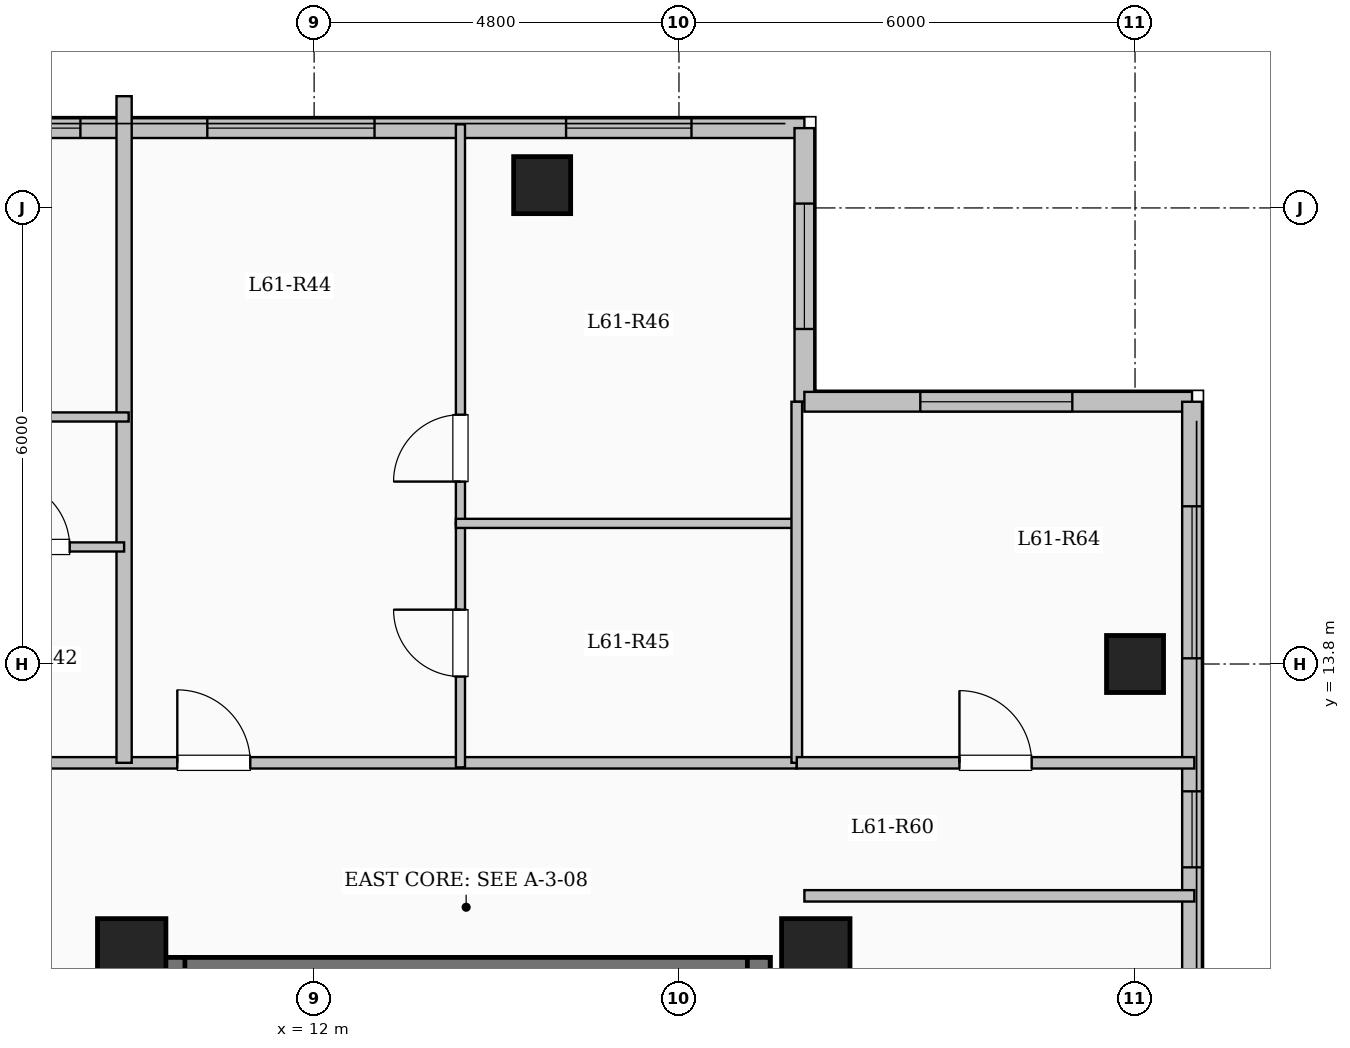
"""IFC4 building model, lengths in metres.
Left out: names, types, materials, properties, quantities, classifications, styles, units other than length and angle.
Written with IfcOpenShell. Run it as: python <this file> out.ifc"""

import sys

from ifc_helpers import new_model, si_unit, direction, frame, frame_2d, origin, origin_2d, place, context, subcontext, project, spatial, rectangle, extrude, element, fill, save


model = new_model("IFC4")
c1 = context("Model", 3, precision=1e-05, world=origin(), true_north=direction((0.0, 1.0)))
c2 = subcontext(c1, "Body", "Model", "MODEL_VIEW")
j1 = project(units=[si_unit("LENGTHUNIT", "METRE"), si_unit("PLANEANGLEUNIT", "RADIAN")], contexts=[c1])
p1 = place(None, origin())
s1 = spatial("IfcSite", under=j1, at=p1, CompositionType="ELEMENT")
p2 = place(p1, origin())
s2 = spatial("IfcBuilding", under=s1, at=p2, CompositionType="ELEMENT")
p3 = place(p2, frame((0.0, 0.0, 223.75)))
s3 = spatial("IfcBuildingStorey", under=s2, at=p3, CompositionType="ELEMENT", Elevation=223.75)
for number, where, z_axis, x_axis in (
    (1, (9.6, 10.0, 0.0), (0.0, 0.0, 1.0), (1.0, 0.0, 0.0)),
    (2, (18.6, 10.0, 0.0), (0.0, 0.0, 1.0), (1.0, 0.0, 0.0)),
):
    element("IfcColumn", number, at=place(p3, frame(where, z_axis=z_axis, x_axis=x_axis)), inside=s3, PredefinedType="COLUMN", context=c2, shape_type="SweptSolid", body=[
        extrude(rectangle(XDim=0.9, YDim=0.9, at=origin_2d()), origin(), (0.0, 0.0, 1.0), 3.35),
    ])
for number, where, z_axis, x_axis in (
    (3, (15.0, 20.1, 0.0), (0.0, 0.0, 1.0), (1.0, 0.0, 0.0)),
    (4, (22.8, 13.8, 0.0), (0.0, 0.0, 1.0), (1.0, 0.0, 0.0)),
):
    element("IfcColumn", number, at=place(p3, frame(where, z_axis=z_axis, x_axis=x_axis)), inside=s3, PredefinedType="COLUMN", context=c2, shape_type="SweptSolid", body=[
        extrude(rectangle(XDim=0.75, YDim=0.75, at=origin_2d()), origin(), (0.0, 0.0, 1.0), 3.35),
    ])
p4 = place(p3, frame((7.35, 20.85, 0.0), z_axis=(0.0, 0.0, 1.0), x_axis=(1.0, 0.0, 0.0)))
e5 = element("IfcWall", 5, at=p4, inside=s3, PredefinedType="SOLIDWALL", context=c2, shape_type="SweptSolid", body=[
    extrude(rectangle(XDim=11.1, YDim=0.26, at=frame_2d((5.55, 0.0))), origin(), (0.0, 0.0, 1.0), 3.05),
])
p5 = place(p4, frame((0.375, 0.0, 0.95)))
e6 = element("IfcOpeningElement", 6, at=p5, cuts=e5, PredefinedType="OPENING", context=c2, shape_type="SweptSolid", body=[
    extrude(rectangle(XDim=1.2, YDim=1.5, at=frame_2d((0.6, 0.75))), frame((0.0, 0.14, 0.0), z_axis=(0.0, -1.0, 0.0), x_axis=(1.0, 0.0, 0.0)), (0.0, 0.0, 1.0), 0.28),
])
p6 = place(p4, frame((3.245, 0.0, 0.9)))
e7 = element("IfcOpeningElement", 7, at=p6, cuts=e5, PredefinedType="OPENING", context=c2, shape_type="SweptSolid", body=[
    extrude(rectangle(XDim=2.2, YDim=1.75, at=frame_2d((1.1, 0.875))), frame((0.0, 0.14, 0.0), z_axis=(0.0, -1.0, 0.0), x_axis=(1.0, 0.0, 0.0)), (0.0, 0.0, 1.0), 0.28),
])
p7 = place(p4, frame((7.965, 0.0, 0.9)))
e8 = element("IfcOpeningElement", 8, at=p7, cuts=e5, PredefinedType="OPENING", context=c2, shape_type="SweptSolid", body=[
    extrude(rectangle(XDim=1.65, YDim=1.6, at=frame_2d((0.825, 0.8))), frame((0.0, 0.14, 0.0), z_axis=(0.0, -1.0, 0.0), x_axis=(1.0, 0.0, 0.0)), (0.0, 0.0, 1.0), 0.28),
])
p8 = place(p3, frame((18.45, 20.85, 0.0), z_axis=(0.0, 0.0, 1.0), x_axis=(0.0, -1.0, 0.0)))
e9 = element("IfcWall", 9, at=p8, inside=s3, PredefinedType="SOLIDWALL", context=c2, shape_type="SweptSolid", body=[
    extrude(rectangle(XDim=3.6, YDim=0.26, at=frame_2d((1.8, 0.0))), origin(), (0.0, 0.0, 1.0), 3.05),
])
p9 = place(p8, frame((0.992, 0.0, 0.9)))
e10 = element("IfcOpeningElement", 10, at=p9, cuts=e9, PredefinedType="OPENING", context=c2, shape_type="SweptSolid", body=[
    extrude(rectangle(XDim=1.65, YDim=1.6, at=frame_2d((0.825, 0.8))), frame((0.0, 0.14, 0.0), z_axis=(0.0, -1.0, 0.0), x_axis=(1.0, 0.0, 0.0)), (0.0, 0.0, 1.0), 0.28),
])
p10 = place(p3, frame((18.45, 17.25, 0.0), z_axis=(0.0, 0.0, 1.0), x_axis=(1.0, 0.0, 0.0)))
e11 = element("IfcWall", 11, at=p10, inside=s3, PredefinedType="SOLIDWALL", context=c2, shape_type="SweptSolid", body=[
    extrude(rectangle(XDim=5.1, YDim=0.26, at=frame_2d((2.55, 0.0))), origin(), (0.0, 0.0, 1.0), 3.05),
])
p11 = place(p10, frame((1.525, 0.0, 0.9)))
e12 = element("IfcOpeningElement", 12, at=p11, cuts=e11, PredefinedType="OPENING", context=c2, shape_type="SweptSolid", body=[
    extrude(rectangle(XDim=2.0, YDim=1.7, at=frame_2d((1.0, 0.85))), frame((0.0, 0.14, 0.0), z_axis=(0.0, -1.0, 0.0), x_axis=(1.0, 0.0, 0.0)), (0.0, 0.0, 1.0), 0.28),
])
p12 = place(p3, frame((23.55, 17.25, 0.0), z_axis=(0.0, 0.0, 1.0), x_axis=(0.0, -1.0, 0.0)))
e13 = element("IfcWall", 13, at=p12, inside=s3, PredefinedType="SOLIDWALL", context=c2, shape_type="SweptSolid", body=[
    extrude(rectangle(XDim=34.5, YDim=0.26, at=frame_2d((17.25, 0.0))), origin(), (0.0, 0.0, 1.0), 3.05),
])
p13 = place(p12, frame((1.375, 0.0, 0.9)))
e14 = element("IfcOpeningElement", 14, at=p13, cuts=e13, PredefinedType="OPENING", context=c2, shape_type="SweptSolid", body=[
    extrude(rectangle(XDim=2.0, YDim=1.7, at=frame_2d((1.0, 0.85))), frame((0.0, 0.14, 0.0), z_axis=(0.0, -1.0, 0.0), x_axis=(1.0, 0.0, 0.0)), (0.0, 0.0, 1.0), 0.28),
])
p14 = place(p12, frame((5.125, 0.0, 0.95)))
e15 = element("IfcOpeningElement", 15, at=p14, cuts=e13, PredefinedType="OPENING", context=c2, shape_type="SweptSolid", body=[
    extrude(rectangle(XDim=1.0, YDim=1.5, at=frame_2d((0.5, 0.75))), frame((0.0, 0.14, 0.0), z_axis=(0.0, -1.0, 0.0), x_axis=(1.0, 0.0, 0.0)), (0.0, 0.0, 1.0), 0.28),
])
p15 = place(p12, frame((8.375, 0.0, 0.9)))
e16 = element("IfcOpeningElement", 16, at=p15, cuts=e13, PredefinedType="OPENING", context=c2, shape_type="SweptSolid", body=[
    extrude(rectangle(XDim=2.0, YDim=1.7, at=frame_2d((1.0, 0.85))), frame((0.0, 0.14, 0.0), z_axis=(0.0, -1.0, 0.0), x_axis=(1.0, 0.0, 0.0)), (0.0, 0.0, 1.0), 0.28),
])
p16 = place(p12, frame((13.2, 0.0, 0.9)))
e17 = element("IfcOpeningElement", 17, at=p16, cuts=e13, PredefinedType="OPENING", context=c2, shape_type="SweptSolid", body=[
    extrude(rectangle(XDim=1.65, YDim=1.6, at=frame_2d((0.825, 0.8))), frame((0.0, 0.14, 0.0), z_axis=(0.0, -1.0, 0.0), x_axis=(1.0, 0.0, 0.0)), (0.0, 0.0, 1.0), 0.28),
])
p17 = place(p12, frame((19.05, 0.0, 0.9)))
e18 = element("IfcOpeningElement", 18, at=p17, cuts=e13, PredefinedType="OPENING", context=c2, shape_type="SweptSolid", body=[
    extrude(rectangle(XDim=2.2, YDim=1.75, at=frame_2d((1.1, 0.875))), frame((0.0, 0.14, 0.0), z_axis=(0.0, -1.0, 0.0), x_axis=(1.0, 0.0, 0.0)), (0.0, 0.0, 1.0), 0.28),
])
p18 = place(p12, frame((24.975, 0.0, 0.95)))
e19 = element("IfcOpeningElement", 19, at=p18, cuts=e13, PredefinedType="OPENING", context=c2, shape_type="SweptSolid", body=[
    extrude(rectangle(XDim=1.2, YDim=1.5, at=frame_2d((0.6, 0.75))), frame((0.0, 0.14, 0.0), z_axis=(0.0, -1.0, 0.0), x_axis=(1.0, 0.0, 0.0)), (0.0, 0.0, 1.0), 0.28),
])
p19 = place(p12, frame((29.475, 0.0, 0.9)))
e20 = element("IfcOpeningElement", 20, at=p19, cuts=e13, PredefinedType="OPENING", context=c2, shape_type="SweptSolid", body=[
    extrude(rectangle(XDim=2.2, YDim=1.75, at=frame_2d((1.1, 0.875))), frame((0.0, 0.14, 0.0), z_axis=(0.0, -1.0, 0.0), x_axis=(1.0, 0.0, 0.0)), (0.0, 0.0, 1.0), 0.28),
])
p20 = place(p3, frame((10.0, 9.79, 0.0), z_axis=(0.0, 0.0, 1.0), x_axis=(1.0, 0.0, 0.0)))
e21 = element("IfcWall", 21, at=p20, inside=s3, PredefinedType="SHEAR", context=c2, shape_type="SweptSolid", body=[
    extrude(rectangle(XDim=8.0, YDim=0.3, at=frame_2d((4.0, 0.0))), origin(), (0.0, 0.0, 1.0), 3.35),
])
for number, where, z_axis, x_axis in (
    (22, (10.15, 6.35, 0.0), (0.0, 0.0, 1.0), (0.0, 1.0, 0.0)),
    (23, (17.85, 6.35, 0.0), (0.0, 0.0, 1.0), (0.0, 1.0, 0.0)),
):
    element("IfcWall", number, at=place(p3, frame(where, z_axis=z_axis, x_axis=x_axis)), inside=s3, PredefinedType="SHEAR", context=c2, shape_type="SweptSolid", body=[
        extrude(rectangle(XDim=3.59, YDim=0.3, at=frame_2d((1.795, 0.0))), origin(), (0.0, 0.0, 1.0), 3.35),
    ])
p21 = place(p3, frame((3.85, 12.5, 0.0), z_axis=(0.0, 0.0, 1.0), x_axis=(1.0, 0.0, 0.0)))
e24 = element("IfcWall", 24, at=p21, inside=s3, PredefinedType="PARTITIONING", context=c2, shape_type="SweptSolid", body=[
    extrude(rectangle(XDim=14.5, YDim=0.15, at=frame_2d((7.25, 0.0))), origin(), (0.0, 0.0, 1.0), 3.05),
])
p22 = place(p21, frame((1.45, 0.0, 0.0)))
e25 = element("IfcOpeningElement", 25, at=p22, cuts=e24, PredefinedType="OPENING", context=c2, shape_type="SweptSolid", body=[
    extrude(rectangle(XDim=0.96, YDim=2.15, at=frame_2d((0.48, 1.075))), frame((0.0, 0.085, 0.0), z_axis=(0.0, -1.0, 0.0), x_axis=(1.0, 0.0, 0.0)), (0.0, 0.0, 1.0), 0.17),
])
p23 = place(p21, frame((6.35, 0.0, 0.0)))
e26 = element("IfcOpeningElement", 26, at=p23, cuts=e24, PredefinedType="OPENING", context=c2, shape_type="SweptSolid", body=[
    extrude(rectangle(XDim=0.96, YDim=2.15, at=frame_2d((0.48, 1.075))), frame((0.0, 0.085, 0.0), z_axis=(0.0, -1.0, 0.0), x_axis=(1.0, 0.0, 0.0)), (0.0, 0.0, 1.0), 0.17),
])
p24 = place(p3, frame((9.5, 12.5, 0.0), z_axis=(0.0, 0.0, 1.0), x_axis=(0.0, 1.0, 0.0)))
e27 = element("IfcWall", 27, at=p24, inside=s3, PredefinedType="SOLIDWALL", context=c2, shape_type="SweptSolid", body=[
    extrude(rectangle(XDim=8.77, YDim=0.2, at=frame_2d((4.385, 0.0))), origin(), (0.0, 0.0, 1.0), 3.05),
])
p25 = place(p3, frame((7.188, 15.34, 0.0), z_axis=(0.0, 0.0, 1.0), x_axis=(1.0, 0.0, 0.0)))
e28 = element("IfcWall", 28, at=p25, inside=s3, PredefinedType="PARTITIONING", context=c2, shape_type="SweptSolid", body=[
    extrude(rectangle(XDim=2.312, YDim=0.12, at=frame_2d((1.156, 0.0))), origin(), (0.0, 0.0, 1.0), 2.675),
])
p26 = place(p25, frame((0.716, 0.0, 0.0)))
e29 = element("IfcOpeningElement", 29, at=p26, cuts=e28, PredefinedType="OPENING", context=c2, shape_type="SweptSolid", body=[
    extrude(rectangle(XDim=0.88, YDim=2.1, at=frame_2d((0.44, 1.05))), frame((0.0, 0.07, 0.0), z_axis=(0.0, -1.0, 0.0), x_axis=(1.0, 0.0, 0.0)), (0.0, 0.0, 1.0), 0.14),
])
p27 = place(p3, frame((4.965, 17.05, 0.0), z_axis=(0.0, 0.0, 1.0), x_axis=(1.0, 0.0, 0.0)))
e30 = element("IfcWall", 30, at=p27, inside=s3, PredefinedType="PARTITIONING", context=c2, shape_type="SweptSolid", body=[
    extrude(rectangle(XDim=4.595, YDim=0.12, at=frame_2d((2.297, 0.0))), origin(), (0.0, 0.0, 1.0), 2.675),
])
p28 = place(p27, frame((1.767, 0.0, 0.0)))
e31 = element("IfcOpeningElement", 31, at=p28, cuts=e30, PredefinedType="OPENING", context=c2, shape_type="SweptSolid", body=[
    extrude(rectangle(XDim=0.88, YDim=2.1, at=frame_2d((0.44, 1.05))), frame((0.0, 0.07, 0.0), z_axis=(0.0, -1.0, 0.0), x_axis=(1.0, 0.0, 0.0)), (0.0, 0.0, 1.0), 0.14),
])
p29 = place(p3, frame((13.925, 12.44, 0.0), z_axis=(0.0, 0.0, 1.0), x_axis=(0.0, 1.0, 0.0)))
e32 = element("IfcWall", 32, at=p29, inside=s3, PredefinedType="PARTITIONING", context=c2, shape_type="SweptSolid", body=[
    extrude(rectangle(XDim=3.21, YDim=0.12, at=frame_2d((1.605, 0.0))), origin(), (0.0, 0.0, 1.0), 3.05),
])
p30 = place(p29, frame((1.195, 0.0, 0.0)))
e33 = element("IfcOpeningElement", 33, at=p30, cuts=e32, PredefinedType="OPENING", context=c2, shape_type="SweptSolid", body=[
    extrude(rectangle(XDim=0.88, YDim=2.1, at=frame_2d((0.44, 1.05))), frame((0.0, 0.07, 0.0), z_axis=(0.0, -1.0, 0.0), x_axis=(1.0, 0.0, 0.0)), (0.0, 0.0, 1.0), 0.14),
])
p31 = place(p3, frame((13.925, 15.65, 0.0), z_axis=(0.0, 0.0, 1.0), x_axis=(0.0, 1.0, 0.0)))
e34 = element("IfcWall", 34, at=p31, inside=s3, PredefinedType="PARTITIONING", context=c2, shape_type="SweptSolid", body=[
    extrude(rectangle(XDim=5.25, YDim=0.12, at=frame_2d((2.625, 0.0))), origin(), (0.0, 0.0, 1.0), 3.05),
])
p32 = place(p31, frame((0.55, 0.0, 0.0)))
e35 = element("IfcOpeningElement", 35, at=p32, cuts=e34, PredefinedType="OPENING", context=c2, shape_type="SweptSolid", body=[
    extrude(rectangle(XDim=0.88, YDim=2.1, at=frame_2d((0.44, 1.05))), frame((0.0, 0.07, 0.0), z_axis=(0.0, -1.0, 0.0), x_axis=(1.0, 0.0, 0.0)), (0.0, 0.0, 1.0), 0.14),
])
p33 = place(p3, frame((13.865, 15.65, 0.0), z_axis=(0.0, 0.0, 1.0), x_axis=(1.0, 0.0, 0.0)))
e36 = element("IfcWall", 36, at=p33, inside=s3, PredefinedType="PARTITIONING", context=c2, shape_type="SweptSolid", body=[
    extrude(rectangle(XDim=4.545, YDim=0.12, at=frame_2d((2.272, 0.0))), origin(), (0.0, 0.0, 1.0), 2.675),
])
p34 = place(p3, frame((18.45, 10.75, 0.0), z_axis=(0.0, 0.0, 1.0), x_axis=(1.0, 0.0, 0.0)))
e37 = element("IfcWall", 37, at=p34, inside=s3, PredefinedType="PARTITIONING", context=c2, shape_type="SweptSolid", body=[
    extrude(rectangle(XDim=5.13, YDim=0.15, at=frame_2d((2.565, 0.0))), origin(), (0.0, 0.0, 1.0), 3.05),
])
p35 = place(p3, frame((18.35, 12.5, 0.0), z_axis=(0.0, 0.0, 1.0), x_axis=(0.0, 1.0, 0.0)))
e38 = element("IfcWall", 38, at=p35, inside=s3, PredefinedType="PARTITIONING", context=c2, shape_type="SweptSolid", body=[
    extrude(rectangle(XDim=4.75, YDim=0.14, at=frame_2d((2.375, 0.0))), origin(), (0.0, 0.0, 1.0), 3.05),
])
p36 = place(p3, frame((18.35, 12.5, 0.0), z_axis=(0.0, 0.0, 1.0), x_axis=(1.0, 0.0, 0.0)))
e39 = element("IfcWall", 39, at=p36, inside=s3, PredefinedType="PARTITIONING", context=c2, shape_type="SweptSolid", body=[
    extrude(rectangle(XDim=5.23, YDim=0.15, at=frame_2d((2.615, 0.0))), origin(), (0.0, 0.0, 1.0), 3.05),
])
p37 = place(p36, frame((2.14, 0.0, 0.0)))
e40 = element("IfcOpeningElement", 40, at=p37, cuts=e39, PredefinedType="OPENING", context=c2, shape_type="SweptSolid", body=[
    extrude(rectangle(XDim=0.95, YDim=2.15, at=frame_2d((0.475, 1.075))), frame((0.0, 0.085, 0.0), z_axis=(0.0, -1.0, 0.0), x_axis=(1.0, 0.0, 0.0)), (0.0, 0.0, 1.0), 0.17),
])
p38 = place(p5, origin())
e41 = element("IfcWindow", 41, at=p38, inside=s3, PartitioningType="SINGLE_PANEL", PredefinedType="WINDOW", context=c2, shape_type="SweptSolid", body=[
    extrude(rectangle(XDim=1.2, YDim=1.5, at=frame_2d((0.6, 0.75))), frame((0.0, 0.03, 0.0), z_axis=(0.0, -1.0, 0.0), x_axis=(1.0, 0.0, 0.0)), (0.0, 0.0, 1.0), 0.06),
])
fill(e6, e41)
p39 = place(p6, origin())
e42 = element("IfcWindow", 42, at=p39, inside=s3, PartitioningType="SINGLE_PANEL", PredefinedType="WINDOW", context=c2, shape_type="SweptSolid", body=[
    extrude(rectangle(XDim=2.2, YDim=1.75, at=frame_2d((1.1, 0.875))), frame((0.0, 0.03, 0.0), z_axis=(0.0, -1.0, 0.0), x_axis=(1.0, 0.0, 0.0)), (0.0, 0.0, 1.0), 0.06),
])
fill(e7, e42)
p40 = place(p7, origin())
e43 = element("IfcWindow", 43, at=p40, inside=s3, PartitioningType="SINGLE_PANEL", PredefinedType="WINDOW", context=c2, shape_type="SweptSolid", body=[
    extrude(rectangle(XDim=1.65, YDim=1.6, at=frame_2d((0.825, 0.8))), frame((0.0, 0.03, 0.0), z_axis=(0.0, -1.0, 0.0), x_axis=(1.0, 0.0, 0.0)), (0.0, 0.0, 1.0), 0.06),
])
fill(e8, e43)
p41 = place(p9, origin())
e44 = element("IfcWindow", 44, at=p41, inside=s3, PartitioningType="SINGLE_PANEL", PredefinedType="WINDOW", context=c2, shape_type="SweptSolid", body=[
    extrude(rectangle(XDim=1.65, YDim=1.6, at=frame_2d((0.825, 0.8))), frame((0.0, 0.03, 0.0), z_axis=(0.0, -1.0, 0.0), x_axis=(1.0, 0.0, 0.0)), (0.0, 0.0, 1.0), 0.06),
])
fill(e10, e44)
p42 = place(p11, origin())
e45 = element("IfcWindow", 45, at=p42, inside=s3, PartitioningType="SINGLE_PANEL", PredefinedType="WINDOW", context=c2, shape_type="SweptSolid", body=[
    extrude(rectangle(XDim=2.0, YDim=1.7, at=frame_2d((1.0, 0.85))), frame((0.0, 0.03, 0.0), z_axis=(0.0, -1.0, 0.0), x_axis=(1.0, 0.0, 0.0)), (0.0, 0.0, 1.0), 0.06),
])
fill(e12, e45)
p43 = place(p13, origin())
e46 = element("IfcWindow", 46, at=p43, inside=s3, PartitioningType="SINGLE_PANEL", PredefinedType="WINDOW", context=c2, shape_type="SweptSolid", body=[
    extrude(rectangle(XDim=2.0, YDim=1.7, at=frame_2d((1.0, 0.85))), frame((0.0, 0.03, 0.0), z_axis=(0.0, -1.0, 0.0), x_axis=(1.0, 0.0, 0.0)), (0.0, 0.0, 1.0), 0.06),
])
fill(e14, e46)
p44 = place(p14, origin())
e47 = element("IfcWindow", 47, at=p44, inside=s3, PartitioningType="SINGLE_PANEL", PredefinedType="WINDOW", context=c2, shape_type="SweptSolid", body=[
    extrude(rectangle(XDim=1.0, YDim=1.5, at=frame_2d((0.5, 0.75))), frame((0.0, 0.03, 0.0), z_axis=(0.0, -1.0, 0.0), x_axis=(1.0, 0.0, 0.0)), (0.0, 0.0, 1.0), 0.06),
])
fill(e15, e47)
p45 = place(p26, origin())
e48 = element("IfcDoor", 48, at=p45, inside=s3, OperationType="SINGLE_SWING_LEFT", PredefinedType="DOOR", context=c2, shape_type="SweptSolid", body=[
    extrude(rectangle(XDim=0.88, YDim=2.1, at=frame_2d((0.44, 1.05))), frame((0.0, 0.025, 0.0), z_axis=(0.0, -1.0, 0.0), x_axis=(1.0, 0.0, 0.0)), (0.0, 0.0, 1.0), 0.05),
])
fill(e29, e48)
p46 = place(p23, origin())
e49 = element("IfcDoor", 49, at=p46, inside=s3, OperationType="SINGLE_SWING_LEFT", PredefinedType="DOOR", context=c2, shape_type="SweptSolid", body=[
    extrude(rectangle(XDim=0.96, YDim=2.15, at=frame_2d((0.48, 1.075))), frame((0.0, 0.025, 0.0), z_axis=(0.0, -1.0, 0.0), x_axis=(1.0, 0.0, 0.0)), (0.0, 0.0, 1.0), 0.05),
])
fill(e26, e49)
p47 = place(p30, origin())
e50 = element("IfcDoor", 50, at=p47, inside=s3, OperationType="SINGLE_SWING_RIGHT", PredefinedType="DOOR", context=c2, shape_type="SweptSolid", body=[
    extrude(rectangle(XDim=0.88, YDim=2.1, at=frame_2d((0.44, 1.05))), frame((0.0, 0.025, 0.0), z_axis=(0.0, -1.0, 0.0), x_axis=(1.0, 0.0, 0.0)), (0.0, 0.0, 1.0), 0.05),
])
fill(e33, e50)
p48 = place(p32, origin())
e51 = element("IfcDoor", 51, at=p48, inside=s3, OperationType="SINGLE_SWING_LEFT", PredefinedType="DOOR", context=c2, shape_type="SweptSolid", body=[
    extrude(rectangle(XDim=0.88, YDim=2.1, at=frame_2d((0.44, 1.05))), frame((0.0, 0.025, 0.0), z_axis=(0.0, -1.0, 0.0), x_axis=(1.0, 0.0, 0.0)), (0.0, 0.0, 1.0), 0.05),
])
fill(e35, e51)
p49 = place(p37, origin())
e52 = element("IfcDoor", 52, at=p49, inside=s3, OperationType="SINGLE_SWING_LEFT", PredefinedType="DOOR", context=c2, shape_type="SweptSolid", body=[
    extrude(rectangle(XDim=0.95, YDim=2.15, at=frame_2d((0.475, 1.075))), frame((0.0, 0.025, 0.0), z_axis=(0.0, -1.0, 0.0), x_axis=(1.0, 0.0, 0.0)), (0.0, 0.0, 1.0), 0.05),
])
fill(e40, e52)
save(model, sys.argv[1])
